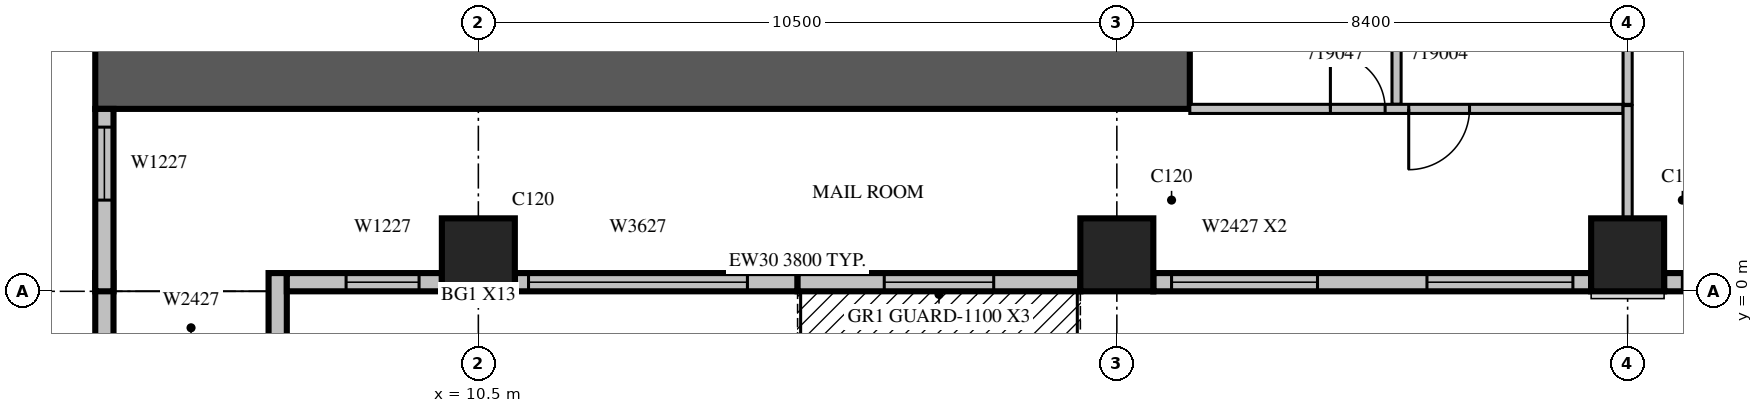
"""IFC4 building model, lengths in metres.
Left out: names, types, materials, properties, quantities, classifications, styles, units other than length and angle.
Written with IfcOpenShell. Run it as: python <this file> out.ifc"""

import sys

from ifc_helpers import new_model, si_unit, direction, frame, frame_2d, origin, origin_2d, place, context, subcontext, project, spatial, rectangle, extrude, source, transform, mapped, element, fill, save


model = new_model("IFC4")
c1 = context("Model", 3, precision=1e-05, world=origin(), true_north=direction((0.0, 1.0)))
c2 = subcontext(c1, "Body", "Model", "MODEL_VIEW")
j1 = project(units=[si_unit("LENGTHUNIT", "METRE"), si_unit("PLANEANGLEUNIT", "RADIAN")], contexts=[c1])
p1 = place(None, origin())
s1 = spatial("IfcSite", under=j1, at=p1, CompositionType="ELEMENT")
p2 = place(p1, origin())
s2 = spatial("IfcBuilding", under=s1, at=p2, CompositionType="ELEMENT")
p3 = place(p2, frame((0.0, 0.0, 90.9)))
s3 = spatial("IfcBuildingStorey", under=s2, at=p3, CompositionType="ELEMENT", Elevation=90.9)
m1 = source(origin(), c2, "Body", "SweptSolid", [
    extrude(rectangle(XDim=1.2, YDim=1.2, at=origin_2d()), origin(), (0.0, 0.0, 1.0), 4.2),
])
for number, where, z_axis, x_axis in (
    (1, (10.5, 0.6, 0.0), (0.0, 0.0, 1.0), (1.0, 0.0, 0.0)),
    (2, (21.0, 0.6, 0.0), (0.0, 0.0, 1.0), (1.0, 0.0, 0.0)),
    (3, (29.4, 0.6, 0.0), (0.0, 0.0, 1.0), (1.0, 0.0, 0.0)),
):
    element("IfcColumn", number, at=place(p3, frame(where, z_axis=z_axis, x_axis=x_axis)), inside=s3, PredefinedType="COLUMN", context=c2, shape_type="MappedRepresentation", body=[
        mapped(m1, transform((0.0, 0.0, 0.0), scale=1.0)),
    ])
m2 = source(origin(), c2, "Body", "SweptSolid", [
    extrude(rectangle(XDim=18.0, YDim=1.2, at=frame_2d((9.0, 0.0))), origin(), (0.0, 0.0, 1.0), 4.2),
])
p4 = place(p3, frame((4.2, 3.6, 0.0), z_axis=(0.0, 0.0, 1.0), x_axis=(1.0, 0.0, 0.0)))
e4 = element("IfcWall", 4, at=p4, inside=s3, PredefinedType="SHEAR", context=c2, shape_type="MappedRepresentation", body=[
    mapped(m2, transform((0.0, 0.0, 0.0), scale=1.0)),
])
m3 = source(origin(), c2, "Body", "SweptSolid", [
    extrude(rectangle(XDim=1.2, YDim=0.3, at=frame_2d((0.6, 0.0))), origin(), (0.0, 0.0, 1.0), 3.8),
])
for number, where, z_axis, x_axis in (
    (5, (4.35, 0.3, 0.0), (0.0, 0.0, 1.0), (0.0, -1.0, 0.0)),
    (6, (7.2, 0.3, 0.0), (0.0, 0.0, 1.0), (0.0, -1.0, 0.0)),
):
    element("IfcWall", number, at=place(p3, frame(where, z_axis=z_axis, x_axis=x_axis)), inside=s3, PredefinedType="STANDARD", context=c2, shape_type="MappedRepresentation", body=[
        mapped(m3, transform((0.0, 0.0, 0.0), scale=1.0)),
    ])
m4 = source(origin(), c2, "Body", "SweptSolid", [
    extrude(rectangle(XDim=2.55, YDim=0.3, at=frame_2d((1.275, 0.0))), origin(), (0.0, 0.0, 1.0), 3.8),
])
p5 = place(p3, frame((7.35, 0.15, 0.0), z_axis=(0.0, 0.0, 1.0), x_axis=(1.0, 0.0, 0.0)))
e7 = element("IfcWall", 7, at=p5, inside=s3, PredefinedType="STANDARD", context=c2, shape_type="MappedRepresentation", body=[
    mapped(m4, transform((0.0, 0.0, 0.0), scale=1.0)),
])
m5 = source(origin(), c2, "Body", "SweptSolid", [
    extrude(rectangle(XDim=1.2, YDim=2.7, at=frame_2d((0.6, 1.35))), frame((0.0, 0.16, 0.0), z_axis=(0.0, -1.0, 0.0), x_axis=(1.0, 0.0, 0.0)), (0.0, 0.0, 1.0), 0.32),
])
p6 = place(p5, frame((0.975, 0.0, 0.6)))
e8 = element("IfcOpeningElement", 8, at=p6, cuts=e7, PredefinedType="OPENING", context=c2, shape_type="MappedRepresentation", body=[
    mapped(m5, transform((0.0, 0.0, 0.0), scale=1.0)),
])
m6 = source(origin(), c2, "Body", "SweptSolid", [
    extrude(rectangle(XDim=4.65, YDim=0.3, at=frame_2d((2.325, 0.0))), origin(), (0.0, 0.0, 1.0), 3.8),
])
p7 = place(p3, frame((11.1, 0.15, 0.0), z_axis=(0.0, 0.0, 1.0), x_axis=(1.0, 0.0, 0.0)))
e9 = element("IfcWall", 9, at=p7, inside=s3, PredefinedType="STANDARD", context=c2, shape_type="MappedRepresentation", body=[
    mapped(m6, transform((0.0, 0.0, 0.0), scale=1.0)),
])
m7 = source(origin(), c2, "Body", "SweptSolid", [
    extrude(rectangle(XDim=3.6, YDim=2.7, at=frame_2d((1.8, 1.35))), frame((0.0, 0.16, 0.0), z_axis=(0.0, -1.0, 0.0), x_axis=(1.0, 0.0, 0.0)), (0.0, 0.0, 1.0), 0.32),
])
p8 = place(p7, frame((0.225, 0.0, 0.6)))
e10 = element("IfcOpeningElement", 10, at=p8, cuts=e9, PredefinedType="OPENING", context=c2, shape_type="MappedRepresentation", body=[
    mapped(m7, transform((0.0, 0.0, 0.0), scale=1.0)),
])
p9 = place(p3, frame((15.75, 0.15, 0.0), z_axis=(0.0, 0.0, 1.0), x_axis=(1.0, 0.0, 0.0)))
e11 = element("IfcWall", 11, at=p9, inside=s3, PredefinedType="STANDARD", context=c2, shape_type="MappedRepresentation", body=[
    mapped(m6, transform((0.0, 0.0, 0.0), scale=1.0)),
])
m8 = source(origin(), c2, "Body", "SweptSolid", [
    extrude(rectangle(XDim=1.8, YDim=2.4, at=frame_2d((0.9, 1.2))), frame((0.0, 0.16, 0.0), z_axis=(0.0, -1.0, 0.0), x_axis=(1.0, 0.0, 0.0)), (0.0, 0.0, 1.0), 0.32),
])
p10 = place(p9, frame((1.425, 0.0, 0.0)))
e12 = element("IfcOpeningElement", 12, at=p10, cuts=e11, PredefinedType="OPENING", context=c2, shape_type="MappedRepresentation", body=[
    mapped(m8, transform((0.0, 0.0, 0.0), scale=1.0)),
])
m9 = source(origin(), c2, "Body", "SweptSolid", [
    extrude(rectangle(XDim=7.2, YDim=0.3, at=frame_2d((3.6, 0.0))), origin(), (0.0, 0.0, 1.0), 3.8),
])
p11 = place(p3, frame((21.6, 0.15, 0.0), z_axis=(0.0, 0.0, 1.0), x_axis=(1.0, 0.0, 0.0)))
e13 = element("IfcWall", 13, at=p11, inside=s3, PredefinedType="STANDARD", context=c2, shape_type="MappedRepresentation", body=[
    mapped(m9, transform((0.0, 0.0, 0.0), scale=1.0)),
])
m10 = source(origin(), c2, "Body", "SweptSolid", [
    extrude(rectangle(XDim=2.4, YDim=2.7, at=frame_2d((1.2, 1.35))), frame((0.0, 0.16, 0.0), z_axis=(0.0, -1.0, 0.0), x_axis=(1.0, 0.0, 0.0)), (0.0, 0.0, 1.0), 0.32),
])
p12 = place(p11, frame((0.3, 0.0, 0.6)))
e14 = element("IfcOpeningElement", 14, at=p12, cuts=e13, PredefinedType="OPENING", context=c2, shape_type="MappedRepresentation", body=[
    mapped(m10, transform((0.0, 0.0, 0.0), scale=1.0)),
])
p13 = place(p11, frame((4.5, 0.0, 0.6)))
e15 = element("IfcOpeningElement", 15, at=p13, cuts=e13, PredefinedType="OPENING", context=c2, shape_type="MappedRepresentation", body=[
    mapped(m10, transform((0.0, 0.0, 0.0), scale=1.0)),
])
m11 = source(origin(), c2, "Body", "SweptSolid", [
    extrude(rectangle(XDim=1.8, YDim=0.3, at=frame_2d((0.9, 0.0))), origin(), (0.0, 0.0, 1.0), 3.8),
])
p14 = place(p3, frame((30.0, 0.15, 0.0), z_axis=(0.0, 0.0, 1.0), x_axis=(1.0, 0.0, 0.0)))
e16 = element("IfcWall", 16, at=p14, inside=s3, PredefinedType="STANDARD", context=c2, shape_type="MappedRepresentation", body=[
    mapped(m11, transform((0.0, 0.0, 0.0), scale=1.0)),
])
p15 = place(p14, frame((0.3, 0.0, 0.6)))
e17 = element("IfcOpeningElement", 17, at=p15, cuts=e16, PredefinedType="OPENING", context=c2, shape_type="MappedRepresentation", body=[
    mapped(m5, transform((0.0, 0.0, 0.0), scale=1.0)),
])
m12 = source(origin(), c2, "Body", "SweptSolid", [
    extrude(rectangle(XDim=3.0, YDim=0.3, at=frame_2d((1.5, 0.0))), origin(), (0.0, 0.0, 1.0), 3.8),
])
p16 = place(p3, frame((4.35, 3.0, 0.0), z_axis=(0.0, 0.0, 1.0), x_axis=(0.0, -1.0, 0.0)))
e18 = element("IfcWall", 18, at=p16, inside=s3, PredefinedType="STANDARD", context=c2, shape_type="MappedRepresentation", body=[
    mapped(m12, transform((0.0, 0.0, 0.0), scale=1.0)),
])
p17 = place(p16, frame((0.3, 0.0, 0.6)))
e19 = element("IfcOpeningElement", 19, at=p17, cuts=e18, PredefinedType="OPENING", context=c2, shape_type="MappedRepresentation", body=[
    mapped(m5, transform((0.0, 0.0, 0.0), scale=1.0)),
])
m13 = source(origin(), c2, "Body", "SweptSolid", [
    extrude(rectangle(XDim=11.925, YDim=0.15, at=frame_2d((5.963, 0.0))), origin(), (0.0, 0.0, 1.0), 3.8),
])
p18 = place(p3, frame((25.6, 15.0, 0.0), z_axis=(0.0, 0.0, 1.0), x_axis=(0.0, -1.0, 0.0)))
e20 = element("IfcWall", 20, at=p18, inside=s3, PredefinedType="PARTITIONING", context=c2, shape_type="MappedRepresentation", body=[
    mapped(m13, transform((0.0, 0.0, 0.0), scale=1.0)),
])
m14 = source(origin(), c2, "Body", "SweptSolid", [
    extrude(rectangle(XDim=0.9, YDim=2.1, at=frame_2d((0.45, 1.05))), frame((0.0, 0.085, 0.0), z_axis=(0.0, -1.0, 0.0), x_axis=(1.0, 0.0, 0.0)), (0.0, 0.0, 1.0), 0.17),
])
p19 = place(p18, frame((7.763, 0.0, 0.0)))
e21 = element("IfcOpeningElement", 21, at=p19, cuts=e20, PredefinedType="OPENING", context=c2, shape_type="MappedRepresentation", body=[
    mapped(m14, transform((0.0, 0.0, 0.0), scale=1.0)),
])
p20 = place(p18, frame((0.925, 0.0, 0.0)))
e22 = element("IfcOpeningElement", 22, at=p20, cuts=e20, PredefinedType="OPENING", context=c2, shape_type="MappedRepresentation", body=[
    mapped(m14, transform((0.0, 0.0, 0.0), scale=1.0)),
])
m15 = source(origin(), c2, "Body", "SweptSolid", [
    extrude(rectangle(XDim=6.826, YDim=0.15, at=frame_2d((3.413, 0.0))), origin(), (0.0, 0.0, 1.0), 3.8),
])
p21 = place(p3, frame((29.4, 3.075, 0.0), z_axis=(0.0, 0.0, 1.0), x_axis=(0.0, 1.0, 0.0)))
e23 = element("IfcWall", 23, at=p21, inside=s3, PredefinedType="PARTITIONING", context=c2, shape_type="MappedRepresentation", body=[
    mapped(m15, transform((0.0, 0.0, 0.0), scale=1.0)),
])
m16 = source(origin(), c2, "Body", "SweptSolid", [
    extrude(rectangle(XDim=7.125, YDim=0.15, at=frame_2d((3.562, 0.0))), origin(), (0.0, 0.0, 1.0), 3.8),
])
p22 = place(p3, frame((22.2, 3.0, 0.0), z_axis=(0.0, 0.0, 1.0), x_axis=(1.0, 0.0, 0.0)))
e24 = element("IfcWall", 24, at=p22, inside=s3, PredefinedType="PARTITIONING", context=c2, shape_type="MappedRepresentation", body=[
    mapped(m16, transform((0.0, 0.0, 0.0), scale=1.0)),
])
m17 = source(origin(), c2, "Body", "SweptSolid", [
    extrude(rectangle(XDim=1.0, YDim=2.1, at=frame_2d((0.5, 1.05))), frame((0.0, 0.085, 0.0), z_axis=(0.0, -1.0, 0.0), x_axis=(1.0, 0.0, 0.0)), (0.0, 0.0, 1.0), 0.17),
])
p23 = place(p22, frame((3.6, 0.0, 0.0)))
e25 = element("IfcOpeningElement", 25, at=p23, cuts=e24, PredefinedType="OPENING", context=c2, shape_type="MappedRepresentation", body=[
    mapped(m17, transform((0.0, 0.0, 0.0), scale=1.0)),
])
p24 = place(p22, frame((2.312, 0.0, 0.0)))
e26 = element("IfcOpeningElement", 26, at=p24, cuts=e24, PredefinedType="OPENING", context=c2, shape_type="MappedRepresentation", body=[
    mapped(m14, transform((0.0, 0.0, 0.0), scale=1.0)),
])
m18 = source(origin(), c2, "Body", "SweptSolid", [
    extrude(rectangle(XDim=1.856, YDim=0.15, at=frame_2d((0.928, 0.0))), origin(), (0.0, 0.0, 1.0), 3.8),
])
p25 = place(p3, frame((29.4, 1.199, 0.0), z_axis=(0.0, 0.0, 1.0), x_axis=(0.0, 1.0, 0.0)))
e27 = element("IfcWall", 27, at=p25, inside=s3, PredefinedType="PARTITIONING", context=c2, shape_type="MappedRepresentation", body=[
    mapped(m18, transform((0.0, 0.0, 0.0), scale=1.0)),
])
m19 = source(origin(), c2, "Body", "SweptSolid", [
    extrude(rectangle(XDim=1.2, YDim=2.7, at=frame_2d((0.6, 1.35))), frame((0.0, 0.03, 0.0), z_axis=(0.0, -1.0, 0.0), x_axis=(1.0, 0.0, 0.0)), (0.0, 0.0, 1.0), 0.06),
])
p26 = place(p6, origin())
e28 = element("IfcWindow", 28, at=p26, inside=s3, PartitioningType="SINGLE_PANEL", PredefinedType="WINDOW", context=c2, shape_type="MappedRepresentation", body=[
    mapped(m19, transform((0.0, 0.0, 0.0), scale=1.0)),
])
fill(e8, e28)
m20 = source(origin(), c2, "Body", "SweptSolid", [
    extrude(rectangle(XDim=3.6, YDim=2.7, at=frame_2d((1.8, 1.35))), frame((0.0, 0.03, 0.0), z_axis=(0.0, -1.0, 0.0), x_axis=(1.0, 0.0, 0.0)), (0.0, 0.0, 1.0), 0.06),
])
p27 = place(p8, origin())
e29 = element("IfcWindow", 29, at=p27, inside=s3, PartitioningType="SINGLE_PANEL", PredefinedType="WINDOW", context=c2, shape_type="MappedRepresentation", body=[
    mapped(m20, transform((0.0, 0.0, 0.0), scale=1.0)),
])
fill(e10, e29)
m21 = source(origin(), c2, "Body", "SweptSolid", [
    extrude(rectangle(XDim=1.8, YDim=2.4, at=frame_2d((0.9, 1.2))), frame((0.0, 0.025, 0.0), z_axis=(0.0, -1.0, 0.0), x_axis=(1.0, 0.0, 0.0)), (0.0, 0.0, 1.0), 0.05),
])
p28 = place(p10, origin())
e30 = element("IfcDoor", 30, at=p28, inside=s3, OperationType="SLIDING_TO_LEFT", PredefinedType="DOOR", context=c2, shape_type="MappedRepresentation", body=[
    mapped(m21, transform((0.0, 0.0, 0.0), scale=1.0)),
])
fill(e12, e30)
m22 = source(origin(), c2, "Body", "SweptSolid", [
    extrude(rectangle(XDim=2.4, YDim=2.7, at=frame_2d((1.2, 1.35))), frame((0.0, 0.03, 0.0), z_axis=(0.0, -1.0, 0.0), x_axis=(1.0, 0.0, 0.0)), (0.0, 0.0, 1.0), 0.06),
])
p29 = place(p12, origin())
e31 = element("IfcWindow", 31, at=p29, inside=s3, PartitioningType="SINGLE_PANEL", PredefinedType="WINDOW", context=c2, shape_type="MappedRepresentation", body=[
    mapped(m22, transform((0.0, 0.0, 0.0), scale=1.0)),
])
fill(e14, e31)
p30 = place(p13, origin())
e32 = element("IfcWindow", 32, at=p30, inside=s3, PartitioningType="SINGLE_PANEL", PredefinedType="WINDOW", context=c2, shape_type="MappedRepresentation", body=[
    mapped(m22, transform((0.0, 0.0, 0.0), scale=1.0)),
])
fill(e15, e32)
p31 = place(p15, origin())
e33 = element("IfcWindow", 33, at=p31, inside=s3, PartitioningType="SINGLE_PANEL", PredefinedType="WINDOW", context=c2, shape_type="MappedRepresentation", body=[
    mapped(m19, transform((0.0, 0.0, 0.0), scale=1.0)),
])
fill(e17, e33)
p32 = place(p17, origin())
e34 = element("IfcWindow", 34, at=p32, inside=s3, PartitioningType="SINGLE_PANEL", PredefinedType="WINDOW", context=c2, shape_type="MappedRepresentation", body=[
    mapped(m19, transform((0.0, 0.0, 0.0), scale=1.0)),
])
fill(e19, e34)
m23 = source(origin(), c2, "Body", "SweptSolid", [
    extrude(rectangle(XDim=1.0, YDim=2.1, at=frame_2d((0.5, 1.05))), frame((0.0, 0.025, 0.0), z_axis=(0.0, -1.0, 0.0), x_axis=(1.0, 0.0, 0.0)), (0.0, 0.0, 1.0), 0.05),
])
p33 = place(p23, origin())
e35 = element("IfcDoor", 35, at=p33, inside=s3, OperationType="SINGLE_SWING_RIGHT", PredefinedType="DOOR", context=c2, shape_type="MappedRepresentation", body=[
    mapped(m23, transform((0.0, 0.0, 0.0), scale=1.0)),
])
fill(e25, e35)
m24 = source(origin(), c2, "Body", "SweptSolid", [
    extrude(rectangle(XDim=0.9, YDim=2.1, at=frame_2d((0.45, 1.05))), frame((0.0, 0.025, 0.0), z_axis=(0.0, -1.0, 0.0), x_axis=(1.0, 0.0, 0.0)), (0.0, 0.0, 1.0), 0.05),
])
p34 = place(p24, origin())
e36 = element("IfcDoor", 36, at=p34, inside=s3, OperationType="SINGLE_SWING_LEFT", PredefinedType="DOOR", context=c2, shape_type="MappedRepresentation", body=[
    mapped(m24, transform((0.0, 0.0, 0.0), scale=1.0)),
])
fill(e26, e36)
save(model, sys.argv[1])
